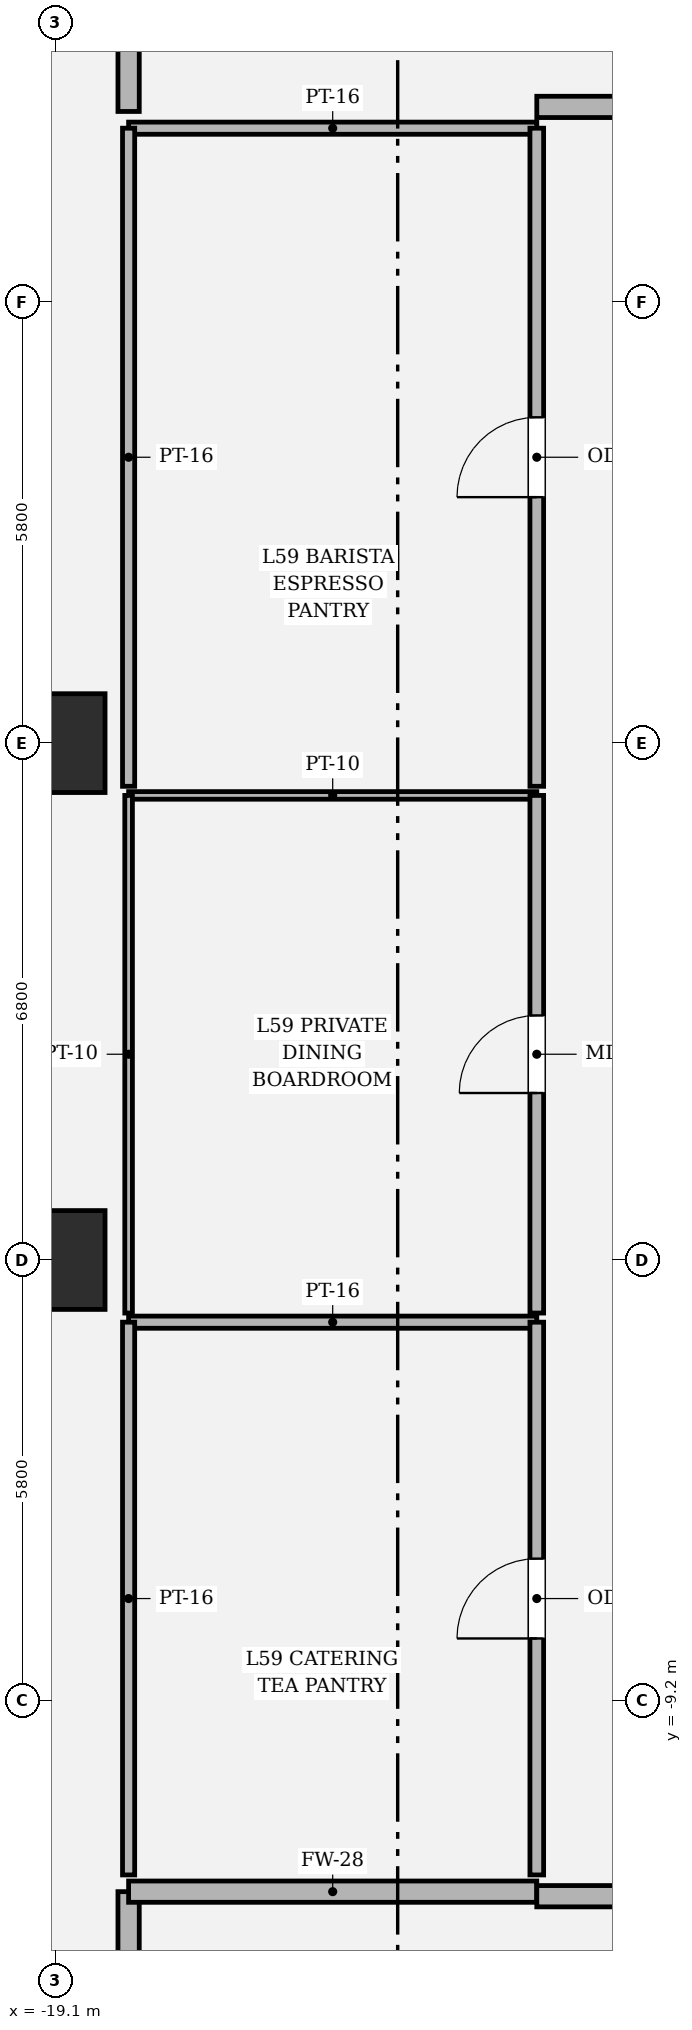
"""IFC4 building model, lengths in metres.
Left out: names, types, materials, properties, quantities, classifications, styles, units other than length and angle.
Written with IfcOpenShell. Run it as: python <this file> out.ifc"""

import sys

from ifc_helpers import new_model, si_unit, direction, frame, frame_2d, origin, origin_2d, place, context, subcontext, project, spatial, rectangle, hollow_rectangle, extrude, element, fill, save


model = new_model("IFC4")
c1 = context("Model", 3, precision=1e-05, world=origin(), true_north=direction((0.0, 1.0)))
c2 = subcontext(c1, "Body", "Model", "MODEL_VIEW")
j1 = project(units=[si_unit("LENGTHUNIT", "METRE"), si_unit("PLANEANGLEUNIT", "RADIAN")], contexts=[c1])
p1 = place(None, origin())
s1 = spatial("IfcSite", under=j1, at=p1, CompositionType="ELEMENT")
p2 = place(p1, origin())
s2 = spatial("IfcBuilding", under=s1, at=p2, CompositionType="ELEMENT")
p3 = place(p2, frame((0.0, 0.0, 251.4)))
s3 = spatial("IfcBuildingStorey", under=s2, at=p3, CompositionType="ELEMENT", Elevation=251.4)
for number, where, z_axis, x_axis in (
    (1, (-19.1, 3.4, 0.0), (0.0, 0.0, 1.0), (1.0, 0.0, 0.0)),
    (2, (-19.1, -3.4, 0.0), (0.0, 0.0, 1.0), (1.0, 0.0, 0.0)),
):
    element("IfcColumn", number, at=place(p3, frame(where, z_axis=z_axis, x_axis=x_axis)), inside=s3, PredefinedType="COLUMN", context=c2, shape_type="SweptSolid", body=[
        extrude(hollow_rectangle(XDim=1.3, YDim=1.3, WallThickness=0.038, at=origin_2d()), origin(), (0.0, 0.0, 1.0), 4.05),
    ])
p4 = place(p3, frame((-18.14, -16.54, 0.0), z_axis=(0.0, 0.0, 1.0), x_axis=(0.0, 1.0, 0.0)))
e3 = element("IfcWall", 3, at=p4, inside=s3, PredefinedType="SOLIDWALL", context=c2, shape_type="SweptSolid", body=[
    extrude(rectangle(XDim=4.83, YDim=0.28, at=frame_2d((2.415, 0.0))), origin(), (0.0, 0.0, 1.0), 3.484),
])
p5 = place(p3, frame((-18.14, -11.71, 0.0), z_axis=(0.0, 0.0, 1.0), x_axis=(1.0, 0.0, 0.0)))
e4 = element("IfcWall", 4, at=p5, inside=s3, PredefinedType="SOLIDWALL", context=c2, shape_type="SweptSolid", body=[
    extrude(rectangle(XDim=5.37, YDim=0.28, at=frame_2d((2.685, 0.0))), origin(), (0.0, 0.0, 1.0), 3.484),
])
p6 = place(p3, frame((-12.77, -11.77, 0.0), z_axis=(0.0, 0.0, 1.0), x_axis=(1.0, 0.0, 0.0)))
e5 = element("IfcWall", 5, at=p6, inside=s3, PredefinedType="SOLIDWALL", context=c2, shape_type="SweptSolid", body=[
    extrude(rectangle(XDim=8.165, YDim=0.28, at=frame_2d((4.083, 0.0))), origin(), (0.0, 0.0, 1.0), 3.244),
])
p7 = place(p6, frame((3.232, 0.0, 0.0)))
e6 = element("IfcOpeningElement", 6, at=p7, cuts=e5, PredefinedType="OPENING", context=c2, shape_type="SweptSolid", body=[
    extrude(rectangle(XDim=1.7, YDim=2.3, at=frame_2d((0.85, 1.15))), frame((0.0, 0.15, 0.0), z_axis=(0.0, -1.0, 0.0), x_axis=(1.0, 0.0, 0.0)), (0.0, 0.0, 1.0), 0.3),
])
p8 = place(p3, frame((-18.14, -4.218, 0.0), z_axis=(0.0, 0.0, 1.0), x_axis=(1.0, 0.0, 0.0)))
e7 = element("IfcWall", 7, at=p8, inside=s3, PredefinedType="PARTITIONING", context=c2, shape_type="SweptSolid", body=[
    extrude(rectangle(XDim=5.37, YDim=0.16, at=frame_2d((2.685, 0.0))), origin(), (0.0, 0.0, 1.0), 3.85),
])
p9 = place(p3, frame((-12.77, -4.218, 0.0), z_axis=(0.0, 0.0, 1.0), x_axis=(0.0, -1.0, 0.0)))
e8 = element("IfcWall", 8, at=p9, inside=s3, PredefinedType="PARTITIONING", context=c2, shape_type="SweptSolid", body=[
    extrude(rectangle(XDim=7.272, YDim=0.18, at=frame_2d((3.636, 0.0))), origin(), (0.0, 0.0, 1.0), 3.244),
])
p10 = place(p9, frame((3.111, 0.0, 0.0)))
e9 = element("IfcOpeningElement", 9, at=p10, cuts=e8, PredefinedType="OPENING", context=c2, shape_type="SweptSolid", body=[
    extrude(rectangle(XDim=1.05, YDim=2.2, at=frame_2d((0.525, 1.1))), frame((0.0, 0.1, 0.0), z_axis=(0.0, -1.0, 0.0), x_axis=(1.0, 0.0, 0.0)), (0.0, 0.0, 1.0), 0.2),
])
p11 = place(p3, frame((-18.14, -11.49, 0.0), z_axis=(0.0, 0.0, 1.0), x_axis=(0.0, 1.0, 0.0)))
e10 = element("IfcWall", 10, at=p11, inside=s3, PredefinedType="PARTITIONING", context=c2, shape_type="SweptSolid", body=[
    extrude(rectangle(XDim=7.272, YDim=0.16, at=frame_2d((3.636, 0.0))), origin(), (0.0, 0.0, 1.0), 3.244),
])
p12 = place(p3, frame((-18.14, 2.712, 0.0), z_axis=(0.0, 0.0, 1.0), x_axis=(1.0, 0.0, 0.0)))
e11 = element("IfcWall", 11, at=p12, inside=s3, PredefinedType="PARTITIONING", context=c2, shape_type="SweptSolid", body=[
    extrude(rectangle(XDim=5.37, YDim=0.1, at=frame_2d((2.685, 0.0))), origin(), (0.0, 0.0, 1.0), 3.85),
])
p13 = place(p3, frame((-12.77, 2.712, 0.0), z_axis=(0.0, 0.0, 1.0), x_axis=(0.0, -1.0, 0.0)))
e12 = element("IfcWall", 12, at=p13, inside=s3, PredefinedType="PARTITIONING", context=c2, shape_type="SweptSolid", body=[
    extrude(rectangle(XDim=6.81, YDim=0.18, at=frame_2d((3.405, 0.0))), origin(), (0.0, 0.0, 1.0), 3.244),
])
p14 = place(p13, frame((2.895, 0.0, 0.0)))
e13 = element("IfcOpeningElement", 13, at=p14, cuts=e12, PredefinedType="OPENING", context=c2, shape_type="SweptSolid", body=[
    extrude(rectangle(XDim=1.02, YDim=2.2, at=frame_2d((0.51, 1.1))), frame((0.0, 0.1, 0.0), z_axis=(0.0, -1.0, 0.0), x_axis=(1.0, 0.0, 0.0)), (0.0, 0.0, 1.0), 0.2),
])
p15 = place(p3, frame((-18.14, -4.098, 0.0), z_axis=(0.0, 0.0, 1.0), x_axis=(0.0, 1.0, 0.0)))
e14 = element("IfcWall", 14, at=p15, inside=s3, PredefinedType="PARTITIONING", context=c2, shape_type="SweptSolid", body=[
    extrude(rectangle(XDim=6.81, YDim=0.1, at=frame_2d((3.405, 0.0))), origin(), (0.0, 0.0, 1.0), 3.244),
])
p16 = place(p3, frame((-18.14, 11.49, 0.0), z_axis=(0.0, 0.0, 1.0), x_axis=(1.0, 0.0, 0.0)))
e15 = element("IfcWall", 15, at=p16, inside=s3, PredefinedType="PARTITIONING", context=c2, shape_type="SweptSolid", body=[
    extrude(rectangle(XDim=5.37, YDim=0.16, at=frame_2d((2.685, 0.0))), origin(), (0.0, 0.0, 1.0), 3.484),
])
p17 = place(p3, frame((-12.77, 11.49, 0.0), z_axis=(0.0, 0.0, 1.0), x_axis=(0.0, -1.0, 0.0)))
e16 = element("IfcWall", 16, at=p17, inside=s3, PredefinedType="PARTITIONING", context=c2, shape_type="SweptSolid", body=[
    extrude(rectangle(XDim=8.658, YDim=0.18, at=frame_2d((4.329, 0.0))), origin(), (0.0, 0.0, 1.0), 3.244),
])
p18 = place(p17, frame((3.804, 0.0, 0.0)))
e17 = element("IfcOpeningElement", 17, at=p18, cuts=e16, PredefinedType="OPENING", context=c2, shape_type="SweptSolid", body=[
    extrude(rectangle(XDim=1.05, YDim=2.2, at=frame_2d((0.525, 1.1))), frame((0.0, 0.1, 0.0), z_axis=(0.0, -1.0, 0.0), x_axis=(1.0, 0.0, 0.0)), (0.0, 0.0, 1.0), 0.2),
])
p19 = place(p3, frame((-18.14, 2.832, 0.0), z_axis=(0.0, 0.0, 1.0), x_axis=(0.0, 1.0, 0.0)))
e18 = element("IfcWall", 18, at=p19, inside=s3, PredefinedType="PARTITIONING", context=c2, shape_type="SweptSolid", body=[
    extrude(rectangle(XDim=8.658, YDim=0.16, at=frame_2d((4.329, 0.0))), origin(), (0.0, 0.0, 1.0), 3.244),
])
p20 = place(p3, frame((-5.994, 11.77, 0.0), z_axis=(0.0, 0.0, 1.0), x_axis=(-1.0, 0.0, 0.0)))
e19 = element("IfcWall", 19, at=p20, inside=s3, PredefinedType="SOLIDWALL", context=c2, shape_type="SweptSolid", body=[
    extrude(rectangle(XDim=6.776, YDim=0.28, at=frame_2d((3.388, 0.0))), origin(), (0.0, 0.0, 1.0), 3.244),
])
p21 = place(p20, frame((2.538, 0.0, 0.0)))
e20 = element("IfcOpeningElement", 20, at=p21, cuts=e19, PredefinedType="OPENING", context=c2, shape_type="SweptSolid", body=[
    extrude(rectangle(XDim=1.7, YDim=2.3, at=frame_2d((0.85, 1.15))), frame((0.0, 0.15, 0.0), z_axis=(0.0, -1.0, 0.0), x_axis=(1.0, 0.0, 0.0)), (0.0, 0.0, 1.0), 0.3),
])
p22 = place(p3, frame((-18.14, 11.71, 0.0), z_axis=(0.0, 0.0, 1.0), x_axis=(0.0, 1.0, 0.0)))
e21 = element("IfcWall", 21, at=p22, inside=s3, PredefinedType="SOLIDWALL", context=c2, shape_type="SweptSolid", body=[
    extrude(rectangle(XDim=10.73, YDim=0.28, at=frame_2d((5.365, 0.0))), origin(), (0.0, 0.0, 1.0), 3.244),
])
p23 = place(p10, origin())
e22 = element("IfcDoor", 22, at=p23, inside=s3, OperationType="SINGLE_SWING_RIGHT", PredefinedType="DOOR", context=c2, shape_type="SweptSolid", body=[
    extrude(rectangle(XDim=1.05, YDim=2.2, at=frame_2d((0.525, 1.1))), frame((0.0, 0.025, 0.0), z_axis=(0.0, -1.0, 0.0), x_axis=(1.0, 0.0, 0.0)), (0.0, 0.0, 1.0), 0.05),
])
fill(e9, e22)
p24 = place(p14, origin())
e23 = element("IfcDoor", 23, at=p24, inside=s3, OperationType="SINGLE_SWING_RIGHT", PredefinedType="DOOR", context=c2, shape_type="SweptSolid", body=[
    extrude(rectangle(XDim=1.02, YDim=2.2, at=frame_2d((0.51, 1.1))), frame((0.0, 0.025, 0.0), z_axis=(0.0, -1.0, 0.0), x_axis=(1.0, 0.0, 0.0)), (0.0, 0.0, 1.0), 0.05),
])
fill(e13, e23)
p25 = place(p18, origin())
e24 = element("IfcDoor", 24, at=p25, inside=s3, OperationType="SINGLE_SWING_RIGHT", PredefinedType="DOOR", context=c2, shape_type="SweptSolid", body=[
    extrude(rectangle(XDim=1.05, YDim=2.2, at=frame_2d((0.525, 1.1))), frame((0.0, 0.025, 0.0), z_axis=(0.0, -1.0, 0.0), x_axis=(1.0, 0.0, 0.0)), (0.0, 0.0, 1.0), 0.05),
])
fill(e17, e24)
save(model, sys.argv[1])
